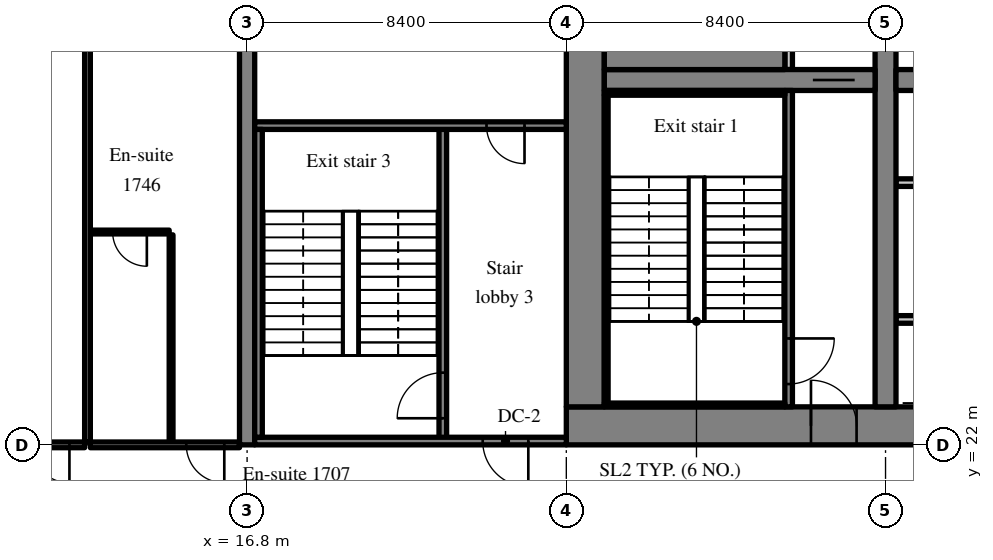
"""IFC4 building model, lengths in metres.
Left out: names, types, materials, properties, quantities, classifications, styles, units other than length and angle.
Written with IfcOpenShell. Run it as: python <this file> out.ifc"""

import sys

from ifc_helpers import new_model, si_unit, direction, frame, frame_2d, origin, place, context, subcontext, project, spatial, rectangle, extrude, source, transform, mapped, element, fill, save


model = new_model("IFC4")
c1 = context("Model", 3, precision=1e-05, world=origin(), true_north=direction((0.0, 1.0)))
c2 = subcontext(c1, "Body", "Model", "MODEL_VIEW")
j1 = project(units=[si_unit("LENGTHUNIT", "METRE"), si_unit("PLANEANGLEUNIT", "RADIAN")], contexts=[c1])
p1 = place(None, origin())
s1 = spatial("IfcSite", under=j1, at=p1, CompositionType="ELEMENT")
p2 = place(p1, origin())
s2 = spatial("IfcBuilding", under=s1, at=p2, CompositionType="ELEMENT")
p3 = place(p2, frame((0.0, 0.0, 73.4)))
s3 = spatial("IfcBuildingStorey", under=s2, at=p3, CompositionType="ELEMENT", Elevation=73.4)
m1 = source(origin(), c2, "Body", "SweptSolid", [
    extrude(rectangle(XDim=50.4, YDim=1.0, at=frame_2d((25.2, 0.0))), origin(), (0.0, 0.0, 1.0), 3.52),
])
p4 = place(p3, frame((25.2, 22.5, 0.0), z_axis=(0.0, 0.0, 1.0), x_axis=(1.0, 0.0, 0.0)))
e1 = element("IfcWall", 1, at=p4, inside=s3, PredefinedType="SHEAR", context=c2, shape_type="MappedRepresentation", body=[
    mapped(m1, transform((0.0, 0.0, 0.0), scale=1.0)),
])
m2 = source(origin(), c2, "Body", "SweptSolid", [
    extrude(rectangle(XDim=1.8, YDim=2.1, at=frame_2d((0.9, 1.05))), frame((0.0, 0.51, 0.0), z_axis=(0.0, -1.0, 0.0), x_axis=(1.0, 0.0, 0.0)), (0.0, 0.0, 1.0), 1.02),
])
p5 = place(p4, frame((15.9, 0.0, 0.0)))
e2 = element("IfcOpeningElement", 2, at=p5, cuts=e1, PredefinedType="OPENING", context=c2, shape_type="MappedRepresentation", body=[
    mapped(m2, transform((0.0, 0.0, 0.0), scale=1.0)),
])
m3 = source(origin(), c2, "Body", "SweptSolid", [
    extrude(rectangle(XDim=1.2, YDim=2.1, at=frame_2d((0.6, 1.05))), frame((0.0, 0.51, 0.0), z_axis=(0.0, -1.0, 0.0), x_axis=(1.0, 0.0, 0.0)), (0.0, 0.0, 1.0), 1.02),
])
p6 = place(p4, frame((26.987, 0.0, 0.0)))
e3 = element("IfcOpeningElement", 3, at=p6, cuts=e1, PredefinedType="OPENING", context=c2, shape_type="MappedRepresentation", body=[
    mapped(m3, transform((0.0, 0.0, 0.0), scale=1.0)),
])
m4 = source(origin(), c2, "Body", "SweptSolid", [
    extrude(rectangle(XDim=0.9, YDim=2.1, at=frame_2d((0.45, 1.05))), frame((0.0, 0.51, 0.0), z_axis=(0.0, -1.0, 0.0), x_axis=(1.0, 0.0, 0.0)), (0.0, 0.0, 1.0), 1.02),
])
p7 = place(p4, frame((32.25, 0.0, 0.0)))
e4 = element("IfcOpeningElement", 4, at=p7, cuts=e1, PredefinedType="OPENING", context=c2, shape_type="MappedRepresentation", body=[
    mapped(m4, transform((0.0, 0.0, 0.0), scale=1.0)),
])
p8 = place(p4, frame((38.262, 0.0, 0.0)))
e5 = element("IfcOpeningElement", 5, at=p8, cuts=e1, PredefinedType="OPENING", context=c2, shape_type="MappedRepresentation", body=[
    mapped(m4, transform((0.0, 0.0, 0.0), scale=1.0)),
])
p9 = place(p4, frame((6.438, 0.0, 0.0)))
e6 = element("IfcOpeningElement", 6, at=p9, cuts=e1, PredefinedType="OPENING", context=c2, shape_type="MappedRepresentation", body=[
    mapped(m3, transform((0.0, 0.0, 0.0), scale=1.0)),
])
p10 = place(p4, frame((47.725, 0.0, 0.0)))
e7 = element("IfcOpeningElement", 7, at=p10, cuts=e1, PredefinedType="OPENING", context=c2, shape_type="MappedRepresentation", body=[
    mapped(m3, transform((0.0, 0.0, 0.0), scale=1.0)),
])
m5 = source(origin(), c2, "Body", "SweptSolid", [
    extrude(rectangle(XDim=18.0, YDim=1.0, at=frame_2d((9.0, 0.0))), origin(), (0.0, 0.0, 1.0), 3.52),
])
p11 = place(p3, frame((25.7, 23.0, 0.0), z_axis=(0.0, 0.0, 1.0), x_axis=(0.0, 1.0, 0.0)))
e8 = element("IfcWall", 8, at=p11, inside=s3, PredefinedType="SHEAR", context=c2, shape_type="MappedRepresentation", body=[
    mapped(m5, transform((0.0, 0.0, 0.0), scale=1.0)),
])
m6 = source(origin(), c2, "Body", "SweptSolid", [
    extrude(rectangle(XDim=18.0, YDim=0.55, at=frame_2d((9.0, 0.0))), origin(), (0.0, 0.0, 1.0), 3.52),
])
p12 = place(p3, frame((33.6, 23.0, 0.0), z_axis=(0.0, 0.0, 1.0), x_axis=(0.0, 1.0, 0.0)))
e9 = element("IfcWall", 9, at=p12, inside=s3, PredefinedType="SHEAR", context=c2, shape_type="MappedRepresentation", body=[
    mapped(m6, transform((0.0, 0.0, 0.0), scale=1.0)),
])
m7 = source(origin(), c2, "Body", "SweptSolid", [
    extrude(rectangle(XDim=1.1, YDim=2.1, at=frame_2d((0.55, 1.05))), frame((0.0, 0.285, 0.0), z_axis=(0.0, -1.0, 0.0), x_axis=(1.0, 0.0, 0.0)), (0.0, 0.0, 1.0), 0.57),
])
p13 = place(p12, frame((12.45, 0.0, 0.0)))
e10 = element("IfcOpeningElement", 10, at=p13, cuts=e9, PredefinedType="OPENING", context=c2, shape_type="MappedRepresentation", body=[
    mapped(m7, transform((0.0, 0.0, 0.0), scale=1.0)),
])
m8 = source(origin(), c2, "Body", "SweptSolid", [
    extrude(rectangle(XDim=7.125, YDim=0.55, at=frame_2d((3.562, 0.0))), origin(), (0.0, 0.0, 1.0), 3.52),
])
p14 = place(p3, frame((26.2, 31.6, 0.0), z_axis=(0.0, 0.0, 1.0), x_axis=(1.0, 0.0, 0.0)))
e11 = element("IfcWall", 11, at=p14, inside=s3, PredefinedType="SHEAR", context=c2, shape_type="MappedRepresentation", body=[
    mapped(m8, transform((0.0, 0.0, 0.0), scale=1.0)),
])
p15 = place(p14, frame((5.488, 0.0, 0.0)))
e12 = element("IfcOpeningElement", 12, at=p15, cuts=e11, PredefinedType="OPENING", context=c2, shape_type="MappedRepresentation", body=[
    mapped(m7, transform((0.0, 0.0, 0.0), scale=1.0)),
])
m9 = source(origin(), c2, "Body", "SweptSolid", [
    extrude(rectangle(XDim=16.25, YDim=0.55, at=frame_2d((8.125, 0.0))), origin(), (0.0, 0.0, 1.0), 3.52),
])
p16 = place(p3, frame((33.875, 31.6, 0.0), z_axis=(0.0, 0.0, 1.0), x_axis=(1.0, 0.0, 0.0)))
e13 = element("IfcWall", 13, at=p16, inside=s3, PredefinedType="SHEAR", context=c2, shape_type="MappedRepresentation", body=[
    mapped(m9, transform((0.0, 0.0, 0.0), scale=1.0)),
])
m10 = source(origin(), c2, "Body", "SweptSolid", [
    extrude(rectangle(XDim=1.0, YDim=2.1, at=frame_2d((0.5, 1.05))), frame((0.0, 0.285, 0.0), z_axis=(0.0, -1.0, 0.0), x_axis=(1.0, 0.0, 0.0)), (0.0, 0.0, 1.0), 0.57),
])
p17 = place(p16, frame((14.687, 0.0, 0.0)))
e14 = element("IfcOpeningElement", 14, at=p17, cuts=e13, PredefinedType="OPENING", context=c2, shape_type="MappedRepresentation", body=[
    mapped(m10, transform((0.0, 0.0, 0.0), scale=1.0)),
])
m11 = source(origin(), c2, "Body", "SweptSolid", [
    extrude(rectangle(XDim=20.0, YDim=0.4, at=frame_2d((10.0, 0.0))), origin(), (0.0, 0.0, 1.0), 3.52),
])
p18 = place(p3, frame((16.8, 22.0, 0.0), z_axis=(0.0, 0.0, 1.0), x_axis=(0.0, 1.0, 0.0)))
e15 = element("IfcWall", 15, at=p18, inside=s3, PredefinedType="SHEAR", context=c2, shape_type="MappedRepresentation", body=[
    mapped(m11, transform((0.0, 0.0, 0.0), scale=1.0)),
])
m12 = source(origin(), c2, "Body", "SweptSolid", [
    extrude(rectangle(XDim=6.025, YDim=0.2, at=frame_2d((3.012, 0.0))), origin(), (0.0, 0.0, 1.0), 3.52),
])
p19 = place(p3, frame((33.875, 25.3, 0.0), z_axis=(0.0, 0.0, 1.0), x_axis=(1.0, 0.0, 0.0)))
e16 = element("IfcWall", 16, at=p19, inside=s3, PredefinedType="SOLIDWALL", context=c2, shape_type="MappedRepresentation", body=[
    mapped(m12, transform((0.0, 0.0, 0.0), scale=1.0)),
])
m13 = source(origin(), c2, "Body", "SweptSolid", [
    extrude(rectangle(XDim=1.1, YDim=2.1, at=frame_2d((0.55, 1.05))), frame((0.0, 0.11, 0.0), z_axis=(0.0, -1.0, 0.0), x_axis=(1.0, 0.0, 0.0)), (0.0, 0.0, 1.0), 0.22),
])
p20 = place(p19, frame((0.975, 0.0, 0.0)))
e17 = element("IfcOpeningElement", 17, at=p20, cuts=e16, PredefinedType="OPENING", context=c2, shape_type="MappedRepresentation", body=[
    mapped(m13, transform((0.0, 0.0, 0.0), scale=1.0)),
])
p21 = place(p19, frame((3.975, 0.0, 0.0)))
e18 = element("IfcOpeningElement", 18, at=p21, cuts=e16, PredefinedType="OPENING", context=c2, shape_type="MappedRepresentation", body=[
    mapped(m13, transform((0.0, 0.0, 0.0), scale=1.0)),
])
m14 = source(origin(), c2, "Body", "SweptSolid", [
    extrude(rectangle(XDim=12.025, YDim=0.2, at=frame_2d((6.012, 0.0))), origin(), (0.0, 0.0, 1.0), 3.52),
])
p22 = place(p3, frame((33.875, 28.9, 0.0), z_axis=(0.0, 0.0, 1.0), x_axis=(1.0, 0.0, 0.0)))
e19 = element("IfcWall", 19, at=p22, inside=s3, PredefinedType="SOLIDWALL", context=c2, shape_type="MappedRepresentation", body=[
    mapped(m14, transform((0.0, 0.0, 0.0), scale=1.0)),
])
p23 = place(p22, frame((0.975, 0.0, 0.0)))
e20 = element("IfcOpeningElement", 20, at=p23, cuts=e19, PredefinedType="OPENING", context=c2, shape_type="MappedRepresentation", body=[
    mapped(m13, transform((0.0, 0.0, 0.0), scale=1.0)),
])
p24 = place(p22, frame((3.975, 0.0, 0.0)))
e21 = element("IfcOpeningElement", 21, at=p24, cuts=e19, PredefinedType="OPENING", context=c2, shape_type="MappedRepresentation", body=[
    mapped(m13, transform((0.0, 0.0, 0.0), scale=1.0)),
])
p25 = place(p22, frame((6.975, 0.0, 0.0)))
e22 = element("IfcOpeningElement", 22, at=p25, cuts=e19, PredefinedType="OPENING", context=c2, shape_type="MappedRepresentation", body=[
    mapped(m13, transform((0.0, 0.0, 0.0), scale=1.0)),
])
p26 = place(p22, frame((9.975, 0.0, 0.0)))
e23 = element("IfcOpeningElement", 23, at=p26, cuts=e19, PredefinedType="OPENING", context=c2, shape_type="MappedRepresentation", body=[
    mapped(m13, transform((0.0, 0.0, 0.0), scale=1.0)),
])
m15 = source(origin(), c2, "Body", "SweptSolid", [
    extrude(rectangle(XDim=8.325, YDim=0.2, at=frame_2d((4.163, 0.0))), origin(), (0.0, 0.0, 1.0), 3.52),
])
p27 = place(p3, frame((31.05, 23.0, 0.0), z_axis=(0.0, 0.0, 1.0), x_axis=(0.0, 1.0, 0.0)))
e24 = element("IfcWall", 24, at=p27, inside=s3, PredefinedType="SOLIDWALL", context=c2, shape_type="MappedRepresentation", body=[
    mapped(m15, transform((0.0, 0.0, 0.0), scale=1.0)),
])
m16 = source(origin(), c2, "Body", "SweptSolid", [
    extrude(rectangle(XDim=1.2, YDim=2.1, at=frame_2d((0.6, 1.05))), frame((0.0, 0.11, 0.0), z_axis=(0.0, -1.0, 0.0), x_axis=(1.0, 0.0, 0.0)), (0.0, 0.0, 1.0), 0.22),
])
p28 = place(p27, frame((0.6, 0.0, 0.0)))
e25 = element("IfcOpeningElement", 25, at=p28, cuts=e24, PredefinedType="OPENING", context=c2, shape_type="MappedRepresentation", body=[
    mapped(m16, transform((0.0, 0.0, 0.0), scale=1.0)),
])
m17 = source(origin(), c2, "Body", "SweptSolid", [
    extrude(rectangle(XDim=1.725, YDim=0.2, at=frame_2d((0.863, 0.0))), origin(), (0.0, 0.0, 1.0), 3.52),
])
p29 = place(p3, frame((31.05, 31.875, 0.0), z_axis=(0.0, 0.0, 1.0), x_axis=(0.0, 1.0, 0.0)))
e26 = element("IfcWall", 26, at=p29, inside=s3, PredefinedType="SOLIDWALL", context=c2, shape_type="MappedRepresentation", body=[
    mapped(m17, transform((0.0, 0.0, 0.0), scale=1.0)),
])
m18 = source(origin(), c2, "Body", "SweptSolid", [
    extrude(rectangle(XDim=8.3, YDim=0.2, at=frame_2d((4.15, 0.0))), origin(), (0.0, 0.0, 1.0), 3.52),
])
p30 = place(p3, frame((21.95, 22.1, 0.0), z_axis=(0.0, 0.0, 1.0), x_axis=(0.0, 1.0, 0.0)))
e27 = element("IfcWall", 27, at=p30, inside=s3, PredefinedType="SOLIDWALL", context=c2, shape_type="MappedRepresentation", body=[
    mapped(m18, transform((0.0, 0.0, 0.0), scale=1.0)),
])
p31 = place(p30, frame((0.6, 0.0, 0.0)))
e28 = element("IfcOpeningElement", 28, at=p31, cuts=e27, PredefinedType="OPENING", context=c2, shape_type="MappedRepresentation", body=[
    mapped(m16, transform((0.0, 0.0, 0.0), scale=1.0)),
])
m19 = source(origin(), c2, "Body", "SweptSolid", [
    extrude(rectangle(XDim=8.2, YDim=0.2, at=frame_2d((4.1, 0.0))), origin(), (0.0, 0.0, 1.0), 3.52),
])
p32 = place(p3, frame((17.0, 22.1, 0.0), z_axis=(0.0, 0.0, 1.0), x_axis=(1.0, 0.0, 0.0)))
e29 = element("IfcWall", 29, at=p32, inside=s3, PredefinedType="SOLIDWALL", context=c2, shape_type="MappedRepresentation", body=[
    mapped(m19, transform((0.0, 0.0, 0.0), scale=1.0)),
])
p33 = place(p32, frame((6.0, 0.0, 0.0)))
e30 = element("IfcOpeningElement", 30, at=p33, cuts=e29, PredefinedType="OPENING", context=c2, shape_type="MappedRepresentation", body=[
    mapped(m16, transform((0.0, 0.0, 0.0), scale=1.0)),
])
p34 = place(p3, frame((17.0, 30.4, 0.0), z_axis=(0.0, 0.0, 1.0), x_axis=(1.0, 0.0, 0.0)))
e31 = element("IfcWall", 31, at=p34, inside=s3, PredefinedType="SOLIDWALL", context=c2, shape_type="MappedRepresentation", body=[
    mapped(m19, transform((0.0, 0.0, 0.0), scale=1.0)),
])
m20 = source(origin(), c2, "Body", "SweptSolid", [
    extrude(rectangle(XDim=1.0, YDim=2.1, at=frame_2d((0.5, 1.05))), frame((0.0, 0.11, 0.0), z_axis=(0.0, -1.0, 0.0), x_axis=(1.0, 0.0, 0.0)), (0.0, 0.0, 1.0), 0.22),
])
p35 = place(p34, frame((6.1, 0.0, 0.0)))
e32 = element("IfcOpeningElement", 32, at=p35, cuts=e31, PredefinedType="OPENING", context=c2, shape_type="MappedRepresentation", body=[
    mapped(m20, transform((0.0, 0.0, 0.0), scale=1.0)),
])
m21 = source(origin(), c2, "Body", "SweptSolid", [
    extrude(rectangle(XDim=4.75, YDim=0.1, at=frame_2d((2.375, 0.0))), origin(), (0.0, 0.0, 1.0), 3.52),
])
p36 = place(p3, frame((26.2, 23.05, 0.0), z_axis=(0.0, 0.0, 1.0), x_axis=(1.0, 0.0, 0.0)))
e33 = element("IfcWall", 33, at=p36, inside=s3, PredefinedType="SOLIDWALL", context=c2, shape_type="MappedRepresentation", body=[
    mapped(m21, transform((0.0, 0.0, 0.0), scale=1.0)),
])
m22 = source(origin(), c2, "Body", "SweptSolid", [
    extrude(rectangle(XDim=4.75, YDim=0.125, at=frame_2d((2.375, 0.0))), origin(), (0.0, 0.0, 1.0), 3.52),
])
p37 = place(p3, frame((26.2, 31.262, 0.0), z_axis=(0.0, 0.0, 1.0), x_axis=(1.0, 0.0, 0.0)))
e34 = element("IfcWall", 34, at=p37, inside=s3, PredefinedType="SOLIDWALL", context=c2, shape_type="MappedRepresentation", body=[
    mapped(m22, transform((0.0, 0.0, 0.0), scale=1.0)),
])
m23 = source(origin(), c2, "Body", "SweptSolid", [
    extrude(rectangle(XDim=8.1, YDim=0.1, at=frame_2d((4.05, 0.0))), origin(), (0.0, 0.0, 1.0), 3.52),
])
p38 = place(p3, frame((26.25, 23.1, 0.0), z_axis=(0.0, 0.0, 1.0), x_axis=(0.0, 1.0, 0.0)))
e35 = element("IfcWall", 35, at=p38, inside=s3, PredefinedType="SOLIDWALL", context=c2, shape_type="MappedRepresentation", body=[
    mapped(m23, transform((0.0, 0.0, 0.0), scale=1.0)),
])
m24 = source(origin(), c2, "Body", "SweptSolid", [
    extrude(rectangle(XDim=8.1, YDim=0.2, at=frame_2d((4.05, 0.0))), origin(), (0.0, 0.0, 1.0), 3.52),
])
p39 = place(p3, frame((17.1, 22.2, 0.0), z_axis=(0.0, 0.0, 1.0), x_axis=(0.0, 1.0, 0.0)))
e36 = element("IfcWall", 36, at=p39, inside=s3, PredefinedType="SOLIDWALL", context=c2, shape_type="MappedRepresentation", body=[
    mapped(m24, transform((0.0, 0.0, 0.0), scale=1.0)),
])
m25 = source(origin(), c2, "Body", "SweptSolid", [
    extrude(rectangle(XDim=4.75, YDim=0.925, at=frame_2d((2.375, 0.0))), origin(), (0.0, 0.0, 1.0), 3.52),
])
p40 = place(p3, frame((26.2, 32.337, 0.0), z_axis=(0.0, 0.0, 1.0), x_axis=(1.0, 0.0, 0.0)))
e37 = element("IfcWall", 37, at=p40, inside=s3, PredefinedType="SOLIDWALL", context=c2, shape_type="MappedRepresentation", body=[
    mapped(m25, transform((0.0, 0.0, 0.0), scale=1.0)),
])
m26 = source(origin(), c2, "Body", "SweptSolid", [
    extrude(rectangle(XDim=3.925, YDim=0.15, at=frame_2d((1.962, 0.0))), origin(), (0.0, 0.0, 1.0), 2.82),
])
p41 = place(p3, frame((8.6, 22.0, 0.0), z_axis=(0.0, 0.0, 1.0), x_axis=(1.0, 0.0, 0.0)))
e38 = element("IfcWall", 38, at=p41, inside=s3, PredefinedType="PARTITIONING", context=c2, shape_type="MappedRepresentation", body=[
    mapped(m26, transform((0.0, 0.0, 0.0), scale=1.0)),
])
m27 = source(origin(), c2, "Body", "SweptSolid", [
    extrude(rectangle(XDim=1.0, YDim=2.1, at=frame_2d((0.5, 1.05))), frame((0.0, 0.085, 0.0), z_axis=(0.0, -1.0, 0.0), x_axis=(1.0, 0.0, 0.0)), (0.0, 0.0, 1.0), 0.17),
])
p42 = place(p41, frame((2.525, 0.0, 0.0)))
e39 = element("IfcOpeningElement", 39, at=p42, cuts=e38, PredefinedType="OPENING", context=c2, shape_type="MappedRepresentation", body=[
    mapped(m27, transform((0.0, 0.0, 0.0), scale=1.0)),
])
m28 = source(origin(), c2, "Body", "SweptSolid", [
    extrude(rectangle(XDim=5.45, YDim=0.1, at=frame_2d((2.725, 0.0))), origin(), (0.0, 0.0, 1.0), 3.52),
])
p43 = place(p3, frame((14.8, 22.075, 0.0), z_axis=(0.0, 0.0, 1.0), x_axis=(0.0, 1.0, 0.0)))
e40 = element("IfcWall", 40, at=p43, inside=s3, PredefinedType="PARTITIONING", context=c2, shape_type="MappedRepresentation", body=[
    mapped(m28, transform((0.0, 0.0, 0.0), scale=1.0)),
])
m29 = source(origin(), c2, "Body", "SweptSolid", [
    extrude(rectangle(XDim=2.075, YDim=0.1, at=frame_2d((1.038, 0.0))), origin(), (0.0, 0.0, 1.0), 3.52),
])
p44 = place(p3, frame((12.675, 27.6, 0.0), z_axis=(0.0, 0.0, 1.0), x_axis=(1.0, 0.0, 0.0)))
e41 = element("IfcWall", 41, at=p44, inside=s3, PredefinedType="PARTITIONING", context=c2, shape_type="MappedRepresentation", body=[
    mapped(m29, transform((0.0, 0.0, 0.0), scale=1.0)),
])
m30 = source(origin(), c2, "Body", "SweptSolid", [
    extrude(rectangle(XDim=0.9, YDim=2.1, at=frame_2d((0.45, 1.05))), frame((0.0, 0.06, 0.0), z_axis=(0.0, -1.0, 0.0), x_axis=(1.0, 0.0, 0.0)), (0.0, 0.0, 1.0), 0.12),
])
p45 = place(p44, frame((0.587, 0.0, 0.0)))
e42 = element("IfcOpeningElement", 42, at=p45, cuts=e41, PredefinedType="OPENING", context=c2, shape_type="MappedRepresentation", body=[
    mapped(m30, transform((0.0, 0.0, 0.0), scale=1.0)),
])
m31 = source(origin(), c2, "Body", "SweptSolid", [
    extrude(rectangle(XDim=3.925, YDim=0.15, at=frame_2d((1.962, 0.0))), origin(), (0.0, 0.0, 1.0), 2.82),
])
p46 = place(p3, frame((12.675, 22.0, 0.0), z_axis=(0.0, 0.0, 1.0), x_axis=(1.0, 0.0, 0.0)))
e43 = element("IfcWall", 43, at=p46, inside=s3, PredefinedType="PARTITIONING", context=c2, shape_type="MappedRepresentation", body=[
    mapped(m31, transform((0.0, 0.0, 0.0), scale=1.0)),
])
p47 = place(p46, frame((2.525, 0.0, 0.0)))
e44 = element("IfcOpeningElement", 44, at=p47, cuts=e43, PredefinedType="OPENING", context=c2, shape_type="MappedRepresentation", body=[
    mapped(m27, transform((0.0, 0.0, 0.0), scale=1.0)),
])
m32 = source(origin(), c2, "Body", "SweptSolid", [
    extrude(rectangle(XDim=19.125, YDim=0.15, at=frame_2d((9.562, 0.0))), origin(), (0.0, 0.0, 1.0), 3.52),
])
p48 = place(p3, frame((12.6, 22.075, 0.0), z_axis=(0.0, 0.0, 1.0), x_axis=(0.0, 1.0, 0.0)))
e45 = element("IfcWall", 45, at=p48, inside=s3, PredefinedType="PARTITIONING", context=c2, shape_type="MappedRepresentation", body=[
    mapped(m32, transform((0.0, 0.0, 0.0), scale=1.0)),
])
m33 = source(origin(), c2, "Body", "SweptSolid", [
    extrude(rectangle(XDim=1.2, YDim=2.1, at=frame_2d((0.6, 1.05))), frame((0.0, 0.025, 0.0), z_axis=(0.0, -1.0, 0.0), x_axis=(1.0, 0.0, 0.0)), (0.0, 0.0, 1.0), 0.05),
])
p49 = place(p28, origin())
e46 = element("IfcDoor", 46, at=p49, inside=s3, OperationType="SINGLE_SWING_RIGHT", PredefinedType="DOOR", context=c2, shape_type="MappedRepresentation", body=[
    mapped(m33, transform((0.0, 0.0, 0.0), scale=1.0)),
])
fill(e25, e46)
m34 = source(origin(), c2, "Body", "SweptSolid", [
    extrude(rectangle(XDim=1.2, YDim=2.1, at=frame_2d((0.6, 1.05))), frame((0.0, 0.375, 0.0), z_axis=(0.0, -1.0, 0.0), x_axis=(1.0, 0.0, 0.0)), (0.0, 0.0, 1.0), 0.05),
])
p50 = place(p9, origin())
e47 = element("IfcDoor", 47, at=p50, inside=s3, OperationType="SINGLE_SWING_LEFT", PredefinedType="DOOR", context=c2, shape_type="MappedRepresentation", body=[
    mapped(m34, transform((0.0, 0.0, 0.0), scale=1.0)),
])
fill(e6, e47)
m35 = source(origin(), c2, "Body", "SweptSolid", [
    extrude(rectangle(XDim=1.1, YDim=2.1, at=frame_2d((0.55, 1.05))), frame((0.0, 0.025, 0.0), z_axis=(0.0, -1.0, 0.0), x_axis=(1.0, 0.0, 0.0)), (0.0, 0.0, 1.0), 0.05),
])
p51 = place(p15, origin())
e48 = element("IfcDoor", 48, at=p51, inside=s3, OperationType="SLIDING_TO_RIGHT", PredefinedType="DOOR", context=c2, shape_type="MappedRepresentation", body=[
    mapped(m35, transform((0.0, 0.0, 0.0), scale=1.0)),
])
fill(e12, e48)
p52 = place(p31, origin())
e49 = element("IfcDoor", 49, at=p52, inside=s3, OperationType="SINGLE_SWING_LEFT", PredefinedType="DOOR", context=c2, shape_type="MappedRepresentation", body=[
    mapped(m33, transform((0.0, 0.0, 0.0), scale=1.0)),
])
fill(e28, e49)
p53 = place(p33, origin())
e50 = element("IfcDoor", 50, at=p53, inside=s3, OperationType="SINGLE_SWING_RIGHT", PredefinedType="DOOR", context=c2, shape_type="MappedRepresentation", body=[
    mapped(m33, transform((0.0, 0.0, 0.0), scale=1.0)),
])
fill(e30, e50)
m36 = source(origin(), c2, "Body", "SweptSolid", [
    extrude(rectangle(XDim=1.0, YDim=2.1, at=frame_2d((0.5, 1.05))), frame((0.0, 0.025, 0.0), z_axis=(0.0, -1.0, 0.0), x_axis=(1.0, 0.0, 0.0)), (0.0, 0.0, 1.0), 0.05),
])
p54 = place(p35, origin())
e51 = element("IfcDoor", 51, at=p54, inside=s3, OperationType="SINGLE_SWING_RIGHT", PredefinedType="DOOR", context=c2, shape_type="MappedRepresentation", body=[
    mapped(m36, transform((0.0, 0.0, 0.0), scale=1.0)),
])
fill(e32, e51)
p55 = place(p42, origin())
e52 = element("IfcDoor", 52, at=p55, inside=s3, OperationType="SINGLE_SWING_RIGHT", PredefinedType="DOOR", context=c2, shape_type="MappedRepresentation", body=[
    mapped(m36, transform((0.0, 0.0, 0.0), scale=1.0)),
])
fill(e39, e52)
m37 = source(origin(), c2, "Body", "SweptSolid", [
    extrude(rectangle(XDim=0.9, YDim=2.1, at=frame_2d((0.45, 1.05))), frame((0.0, 0.025, 0.0), z_axis=(0.0, -1.0, 0.0), x_axis=(1.0, 0.0, 0.0)), (0.0, 0.0, 1.0), 0.05),
])
p56 = place(p45, origin())
e53 = element("IfcDoor", 53, at=p56, inside=s3, OperationType="SINGLE_SWING_RIGHT", PredefinedType="DOOR", context=c2, shape_type="MappedRepresentation", body=[
    mapped(m37, transform((0.0, 0.0, 0.0), scale=1.0)),
])
fill(e42, e53)
p57 = place(p47, origin())
e54 = element("IfcDoor", 54, at=p57, inside=s3, OperationType="SINGLE_SWING_RIGHT", PredefinedType="DOOR", context=c2, shape_type="MappedRepresentation", body=[
    mapped(m36, transform((0.0, 0.0, 0.0), scale=1.0)),
])
fill(e44, e54)
save(model, sys.argv[1])
